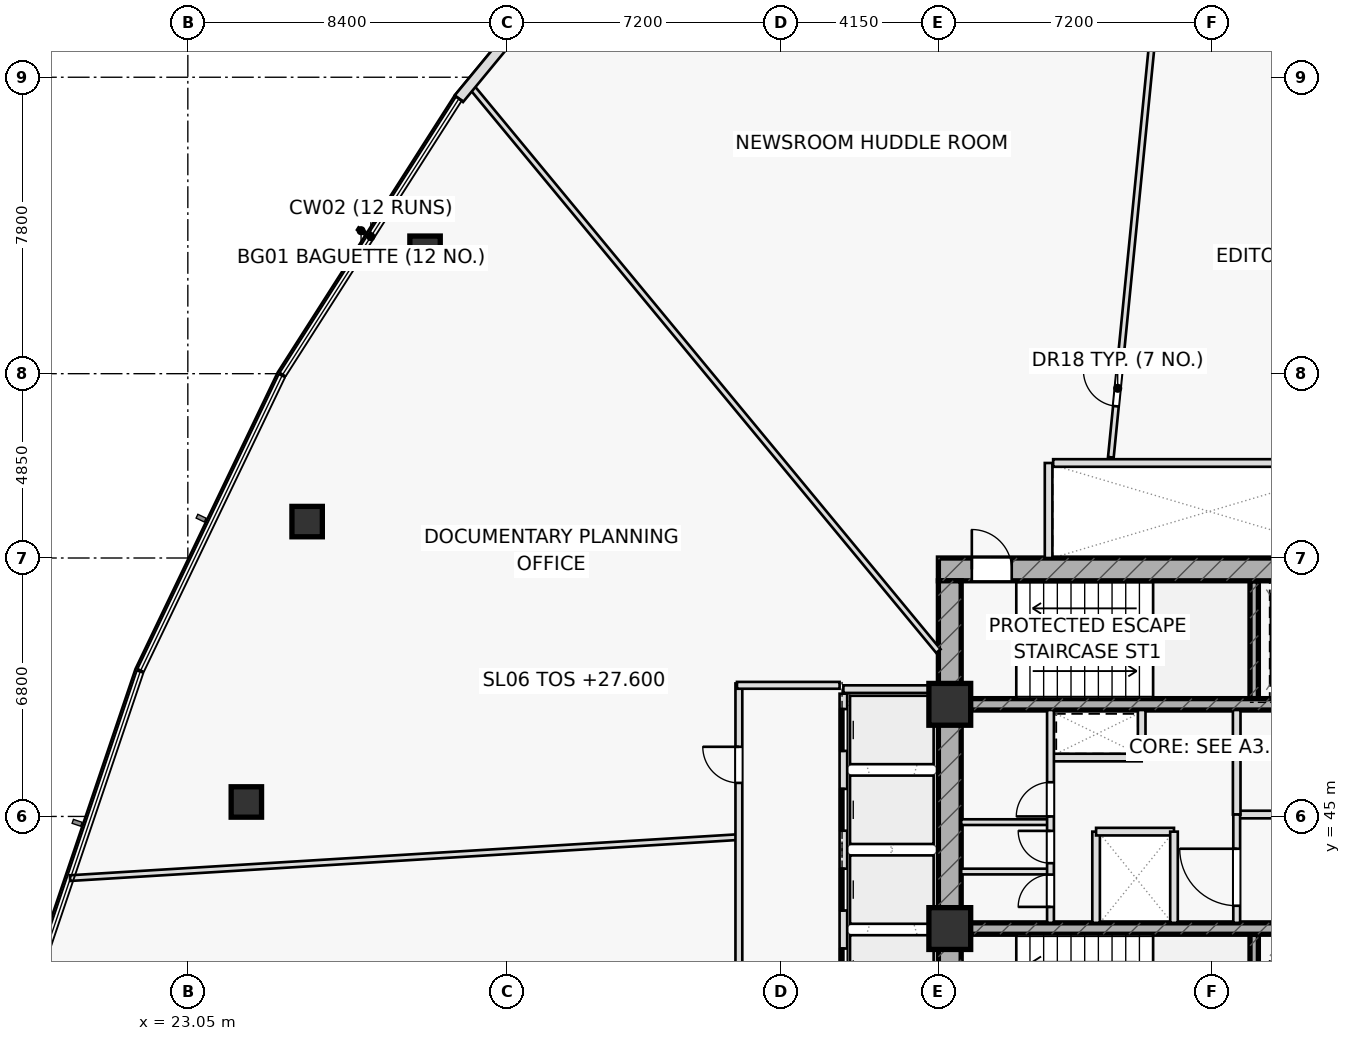
"""IFC4 building model, lengths in metres.
Left out: names, types, materials, properties, quantities, classifications, styles, units other than length and angle.
Written with IfcOpenShell. Run it as: python <this file> out.ifc"""

import sys

from ifc_helpers import new_model, si_unit, direction, frame, frame_2d, origin, origin_2d, place, context, subcontext, project, spatial, rectangle, hollow_rectangle, extrude, element, fill, save


model = new_model("IFC4")
c1 = context("Model", 3, precision=1e-05, world=origin(), true_north=direction((0.0, 1.0)))
c2 = subcontext(c1, "Body", "Model", "MODEL_VIEW")
j1 = project(units=[si_unit("LENGTHUNIT", "METRE"), si_unit("PLANEANGLEUNIT", "RADIAN")], contexts=[c1])
p1 = place(None, origin())
s1 = spatial("IfcSite", under=j1, at=p1, CompositionType="ELEMENT")
p2 = place(p1, origin())
s2 = spatial("IfcBuilding", under=s1, at=p2, CompositionType="ELEMENT")
p3 = place(p2, frame((0.0, 0.0, 27.6)))
s3 = spatial("IfcBuildingStorey", under=s2, at=p3, CompositionType="ELEMENT", Elevation=27.6)
for number, where, z_axis, x_axis in (
    (1, (51.11, 48.1, 0.0), (0.0, 0.0, 1.0), (0.0, 1.0, 0.0)),
    (2, (51.11, 38.8, 0.0), (0.0, 0.0, 1.0), (0.0, 1.0, 0.0)),
):
    element("IfcWall", number, at=place(p3, frame(where, z_axis=z_axis, x_axis=x_axis)), inside=s3, PredefinedType="SHEAR", context=c2, shape_type="SweptSolid", body=[
        extrude(rectangle(XDim=3.1, YDim=0.22, at=frame_2d((1.55, 0.0))), origin(), (0.0, 0.0, 1.0), 3.6),
    ])
p4 = place(p3, frame((42.8, 51.5, 0.0), z_axis=(0.0, 0.0, 1.0), x_axis=(1.0, 0.0, 0.0)))
e3 = element("IfcWall", 3, at=p4, inside=s3, PredefinedType="SHEAR", context=c2, shape_type="SweptSolid", body=[
    extrude(rectangle(XDim=14.4, YDim=0.6, at=frame_2d((7.2, 0.0))), origin(), (0.0, 0.0, 1.0), 3.6),
])
p5 = place(p4, frame((0.88, 0.0, 0.0)))
e4 = element("IfcOpeningElement", 4, at=p5, cuts=e3, PredefinedType="OPENING", context=c2, shape_type="SweptSolid", body=[
    extrude(rectangle(XDim=1.05, YDim=2.2, at=frame_2d((0.525, 1.1))), frame((0.0, 0.31, 0.0), z_axis=(0.0, -1.0, 0.0), x_axis=(1.0, 0.0, 0.0)), (0.0, 0.0, 1.0), 0.62),
])
p6 = place(p3, frame((43.1, 38.8, 0.0), z_axis=(0.0, 0.0, 1.0), x_axis=(0.0, 1.0, 0.0)))
e5 = element("IfcWall", 5, at=p6, inside=s3, PredefinedType="SHEAR", context=c2, shape_type="SweptSolid", body=[
    extrude(rectangle(XDim=12.4, YDim=0.6, at=frame_2d((6.2, 0.0))), origin(), (0.0, 0.0, 1.0), 3.6),
])
p7 = place(p3, frame((43.4, 47.95, 0.0), z_axis=(0.0, 0.0, 1.0), x_axis=(1.0, 0.0, 0.0)))
e6 = element("IfcWall", 6, at=p7, inside=s3, PredefinedType="SHEAR", context=c2, shape_type="SweptSolid", body=[
    extrude(rectangle(XDim=13.2, YDim=0.3, at=frame_2d((6.6, 0.0))), origin(), (0.0, 0.0, 1.0), 3.6),
])
p8 = place(p7, frame((8.345, 0.0, 0.0)))
e7 = element("IfcOpeningElement", 7, at=p8, cuts=e6, PredefinedType="OPENING", context=c2, shape_type="SweptSolid", body=[
    extrude(rectangle(XDim=1.15, YDim=2.2, at=frame_2d((0.575, 1.1))), frame((0.0, 0.16, 0.0), z_axis=(0.0, -1.0, 0.0), x_axis=(1.0, 0.0, 0.0)), (0.0, 0.0, 1.0), 0.32),
])
p9 = place(p7, frame((10.065, 0.0, 0.0)))
e8 = element("IfcOpeningElement", 8, at=p9, cuts=e6, PredefinedType="OPENING", context=c2, shape_type="SweptSolid", body=[
    extrude(rectangle(XDim=1.15, YDim=2.2, at=frame_2d((0.575, 1.1))), frame((0.0, 0.16, 0.0), z_axis=(0.0, -1.0, 0.0), x_axis=(1.0, 0.0, 0.0)), (0.0, 0.0, 1.0), 0.32),
])
p10 = place(p7, frame((11.645, 0.0, 0.0)))
e9 = element("IfcOpeningElement", 9, at=p10, cuts=e6, PredefinedType="OPENING", context=c2, shape_type="SweptSolid", body=[
    extrude(rectangle(XDim=1.15, YDim=2.2, at=frame_2d((0.575, 1.1))), frame((0.0, 0.16, 0.0), z_axis=(0.0, -1.0, 0.0), x_axis=(1.0, 0.0, 0.0)), (0.0, 0.0, 1.0), 0.32),
])
p11 = place(p3, frame((43.4, 42.05, 0.0), z_axis=(0.0, 0.0, 1.0), x_axis=(1.0, 0.0, 0.0)))
e10 = element("IfcWall", 10, at=p11, inside=s3, PredefinedType="SHEAR", context=c2, shape_type="SweptSolid", body=[
    extrude(rectangle(XDim=13.2, YDim=0.3, at=frame_2d((6.6, 0.0))), origin(), (0.0, 0.0, 1.0), 3.6),
])
for number, where, z_axis, x_axis in (
    (11, (43.1, 47.95, 0.0), (0.0, 0.0, 1.0), (1.0, 0.0, 0.0)),
    (12, (43.1, 42.05, 0.0), (0.0, 0.0, 1.0), (1.0, 0.0, 0.0)),
):
    element("IfcColumn", number, at=place(p3, frame(where, z_axis=z_axis, x_axis=x_axis)), inside=s3, PredefinedType="COLUMN", context=c2, shape_type="SweptSolid", body=[
        extrude(rectangle(XDim=1.1, YDim=1.1, at=origin_2d()), origin(), (0.0, 0.0, 1.0), 3.6),
    ])
for number, where, z_axis, x_axis in (
    (13, (29.292, 59.872, 0.0), (0.0, 0.0, 1.0), (1.0, 0.0, 0.0)),
    (14, (26.189, 52.758, 0.0), (0.0, 0.0, 1.0), (1.0, 0.0, 0.0)),
    (15, (24.59, 45.381, 0.0), (0.0, 0.0, 1.0), (1.0, 0.0, 0.0)),
):
    element("IfcColumn", number, at=place(p3, frame(where, z_axis=z_axis, x_axis=x_axis)), inside=s3, PredefinedType="COLUMN", context=c2, shape_type="SweptSolid", body=[
        extrude(hollow_rectangle(XDim=0.8, YDim=0.8, WallThickness=0.045, at=origin_2d()), origin(), (0.0, 0.0, 1.0), 3.6),
    ])
for number, where, z_axis, x_axis in (
    (16, (40.3, 48.35, 0.0), (0.0, 0.0, 1.0), (1.0, 0.0, 0.0)),
    (17, (45.7, 51.8, 0.0), (0.0, 0.0, 1.0), (0.0, 1.0, 0.0)),
):
    element("IfcWall", number, at=place(p3, frame(where, z_axis=z_axis, x_axis=x_axis)), inside=s3, PredefinedType="PARTITIONING", context=c2, shape_type="SweptSolid", body=[
        extrude(rectangle(XDim=2.5, YDim=0.2, at=frame_2d((1.25, 0.0))), origin(), (0.0, 0.0, 1.0), 3.6),
    ])
p12 = place(p3, frame((45.75, 46.55, 0.0), z_axis=(0.0, 0.0, 1.0), x_axis=(1.0, 0.0, 0.0)))
e18 = element("IfcWall", 18, at=p12, inside=s3, PredefinedType="PARTITIONING", context=c2, shape_type="SweptSolid", body=[
    extrude(rectangle(XDim=2.4, YDim=0.2, at=frame_2d((1.2, 0.0))), origin(), (0.0, 0.0, 1.0), 3.6),
])
p13 = place(p3, frame((48.15, 46.55, 0.0), z_axis=(0.0, 0.0, 1.0), x_axis=(0.0, 1.0, 0.0)))
e19 = element("IfcWall", 19, at=p13, inside=s3, PredefinedType="PARTITIONING", context=c2, shape_type="SweptSolid", body=[
    extrude(rectangle(XDim=1.25, YDim=0.2, at=frame_2d((0.625, 0.0))), origin(), (0.0, 0.0, 1.0), 3.6),
])
p14 = place(p3, frame((46.95, 42.2, 0.0), z_axis=(0.0, 0.0, 1.0), x_axis=(0.0, 1.0, 0.0)))
e20 = element("IfcWall", 20, at=p14, inside=s3, PredefinedType="PARTITIONING", context=c2, shape_type="SweptSolid", body=[
    extrude(rectangle(XDim=2.4, YDim=0.2, at=frame_2d((1.2, 0.0))), origin(), (0.0, 0.0, 1.0), 3.6),
])
p15 = place(p3, frame((46.95, 44.6, 0.0), z_axis=(0.0, 0.0, 1.0), x_axis=(1.0, 0.0, 0.0)))
e21 = element("IfcWall", 21, at=p15, inside=s3, PredefinedType="PARTITIONING", context=c2, shape_type="SweptSolid", body=[
    extrude(rectangle(XDim=2.05, YDim=0.2, at=frame_2d((1.025, 0.0))), origin(), (0.0, 0.0, 1.0), 3.6),
])
p16 = place(p3, frame((50.65, 45.05, 0.0), z_axis=(0.0, 0.0, 1.0), x_axis=(1.0, 0.0, 0.0)))
e22 = element("IfcWall", 22, at=p16, inside=s3, PredefinedType="PARTITIONING", context=c2, shape_type="SweptSolid", body=[
    extrude(rectangle(XDim=5.95, YDim=0.2, at=frame_2d((2.975, 0.0))), origin(), (0.0, 0.0, 1.0), 3.6),
])
p17 = place(p16, frame((1.35, 0.0, 0.0)))
e23 = element("IfcOpeningElement", 23, at=p17, cuts=e22, PredefinedType="OPENING", context=c2, shape_type="SweptSolid", body=[
    extrude(rectangle(XDim=1.5, YDim=2.2, at=frame_2d((0.75, 1.1))), frame((0.0, 0.11, 0.0), z_axis=(0.0, -1.0, 0.0), x_axis=(1.0, 0.0, 0.0)), (0.0, 0.0, 1.0), 0.22),
])
p18 = place(p3, frame((50.65, 45.05, 0.0), z_axis=(0.0, 0.0, 1.0), x_axis=(0.0, 1.0, 0.0)))
e24 = element("IfcWall", 24, at=p18, inside=s3, PredefinedType="PARTITIONING", context=c2, shape_type="SweptSolid", body=[
    extrude(rectangle(XDim=2.75, YDim=0.2, at=frame_2d((1.375, 0.0))), origin(), (0.0, 0.0, 1.0), 3.6),
])
p19 = place(p3, frame((50.65, 42.2, 0.0), z_axis=(0.0, 0.0, 1.0), x_axis=(0.0, 1.0, 0.0)))
e25 = element("IfcWall", 25, at=p19, inside=s3, PredefinedType="PARTITIONING", context=c2, shape_type="SweptSolid", body=[
    extrude(rectangle(XDim=2.85, YDim=0.18, at=frame_2d((1.425, 0.0))), origin(), (0.0, 0.0, 1.0), 3.6),
])
p20 = place(p19, frame((0.45, 0.0, 0.0)))
e26 = element("IfcOpeningElement", 26, at=p20, cuts=e25, PredefinedType="OPENING", context=c2, shape_type="SweptSolid", body=[
    extrude(rectangle(XDim=1.5, YDim=2.2, at=frame_2d((0.75, 1.1))), frame((0.0, 0.1, 0.0), z_axis=(0.0, -1.0, 0.0), x_axis=(1.0, 0.0, 0.0)), (0.0, 0.0, 1.0), 0.2),
])
for number, where, z_axis, x_axis in (
    (27, (43.4, 43.55, 0.0), (0.0, 0.0, 1.0), (1.0, 0.0, 0.0)),
    (28, (43.4, 44.85, 0.0), (0.0, 0.0, 1.0), (1.0, 0.0, 0.0)),
):
    element("IfcWall", number, at=place(p3, frame(where, z_axis=z_axis, x_axis=x_axis)), inside=s3, PredefinedType="PARTITIONING", context=c2, shape_type="SweptSolid", body=[
        extrude(rectangle(XDim=2.35, YDim=0.15, at=frame_2d((1.175, 0.0))), origin(), (0.0, 0.0, 1.0), 3.6),
    ])
p21 = place(p3, frame((45.75, 42.2, 0.0), z_axis=(0.0, 0.0, 1.0), x_axis=(0.0, 1.0, 0.0)))
e29 = element("IfcWall", 29, at=p21, inside=s3, PredefinedType="PARTITIONING", context=c2, shape_type="SweptSolid", body=[
    extrude(rectangle(XDim=5.6, YDim=0.18, at=frame_2d((2.8, 0.0))), origin(), (0.0, 0.0, 1.0), 3.6),
])
p22 = place(p21, frame((0.42, 0.0, 0.0)))
e30 = element("IfcOpeningElement", 30, at=p22, cuts=e29, PredefinedType="OPENING", context=c2, shape_type="SweptSolid", body=[
    extrude(rectangle(XDim=0.85, YDim=2.05, at=frame_2d((0.425, 1.025))), frame((0.0, 0.1, 0.0), z_axis=(0.0, -1.0, 0.0), x_axis=(1.0, 0.0, 0.0)), (0.0, 0.0, 1.0), 0.2),
])
p23 = place(p21, frame((1.57, 0.0, 0.0)))
e31 = element("IfcOpeningElement", 31, at=p23, cuts=e29, PredefinedType="OPENING", context=c2, shape_type="SweptSolid", body=[
    extrude(rectangle(XDim=0.85, YDim=2.05, at=frame_2d((0.425, 1.025))), frame((0.0, 0.1, 0.0), z_axis=(0.0, -1.0, 0.0), x_axis=(1.0, 0.0, 0.0)), (0.0, 0.0, 1.0), 0.2),
])
p24 = place(p21, frame((2.8, 0.0, 0.0)))
e32 = element("IfcOpeningElement", 32, at=p24, cuts=e29, PredefinedType="OPENING", context=c2, shape_type="SweptSolid", body=[
    extrude(rectangle(XDim=0.9, YDim=2.05, at=frame_2d((0.45, 1.025))), frame((0.0, 0.1, 0.0), z_axis=(0.0, -1.0, 0.0), x_axis=(1.0, 0.0, 0.0)), (0.0, 0.0, 1.0), 0.2),
])
p25 = place(p3, frame((47.338, 54.45, 0.0), z_axis=(0.0, 0.0, 1.0), x_axis=(0.098805694286, 0.995106745418, 0.0)))
e33 = element("IfcWall", 33, at=p25, inside=s3, PredefinedType="PARTITIONING", context=c2, shape_type="SweptSolid", body=[
    extrude(rectangle(XDim=22.51, YDim=0.15, at=frame_2d((11.255, 0.0))), origin(), (0.0, 0.0, 1.0), 2.975),
])
p26 = place(p25, frame((1.35, 0.0, 0.0)))
e34 = element("IfcOpeningElement", 34, at=p26, cuts=e33, PredefinedType="OPENING", context=c2, shape_type="SweptSolid", body=[
    extrude(rectangle(XDim=0.95, YDim=2.05, at=frame_2d((0.475, 1.025))), frame((0.0, 0.085, 0.0), z_axis=(0.0, -1.0, 0.0), x_axis=(1.0, 0.0, 0.0)), (0.0, 0.0, 1.0), 0.17),
])
p27 = place(p3, frame((42.8, 49.351, 0.0), z_axis=(0.0, 0.0, 1.0), x_axis=(-0.637468497452, 0.770476420637, 0.0)))
e35 = element("IfcWall", 35, at=p27, inside=s3, PredefinedType="PARTITIONING", context=c2, shape_type="SweptSolid", body=[
    extrude(rectangle(XDim=19.339, YDim=0.15, at=frame_2d((9.669, 0.0))), origin(), (0.0, 0.0, 1.0), 2.925),
])
p28 = place(p3, frame((37.55, 44.457, 0.0), z_axis=(0.0, 0.0, 1.0), x_axis=(-0.998123200765, -0.061237864879, 0.0)))
e36 = element("IfcWall", 36, at=p28, inside=s3, PredefinedType="PARTITIONING", context=c2, shape_type="SweptSolid", body=[
    extrude(rectangle(XDim=17.634, YDim=0.15, at=frame_2d((8.817, 0.0))), origin(), (0.0, 0.0, 1.0), 2.975),
])
p29 = place(p3, frame((37.55, 35.75, 0.0), z_axis=(0.0, 0.0, 1.0), x_axis=(0.0, 1.0, 0.0)))
e37 = element("IfcWall", 37, at=p29, inside=s3, PredefinedType="PARTITIONING", context=c2, shape_type="SweptSolid", body=[
    extrude(rectangle(XDim=12.75, YDim=0.18, at=frame_2d((6.375, 0.0))), origin(), (0.0, 0.0, 1.0), 2.925),
])
p30 = place(p29, frame((3.993, 0.0, 0.0)))
e38 = element("IfcOpeningElement", 38, at=p30, cuts=e37, PredefinedType="OPENING", context=c2, shape_type="SweptSolid", body=[
    extrude(rectangle(XDim=0.95, YDim=2.05, at=frame_2d((0.475, 1.025))), frame((0.0, 0.1, 0.0), z_axis=(0.0, -1.0, 0.0), x_axis=(1.0, 0.0, 0.0)), (0.0, 0.0, 1.0), 0.2),
])
p31 = place(p29, frame((10.132, 0.0, 0.0)))
e39 = element("IfcOpeningElement", 39, at=p31, cuts=e37, PredefinedType="OPENING", context=c2, shape_type="SweptSolid", body=[
    extrude(rectangle(XDim=0.95, YDim=2.05, at=frame_2d((0.475, 1.025))), frame((0.0, 0.1, 0.0), z_axis=(0.0, -1.0, 0.0), x_axis=(1.0, 0.0, 0.0)), (0.0, 0.0, 1.0), 0.2),
])
p32 = place(p3, frame((37.5, 48.45, 0.0), z_axis=(0.0, 0.0, 1.0), x_axis=(1.0, 0.0, 0.0)))
e40 = element("IfcWall", 40, at=p32, inside=s3, PredefinedType="PARTITIONING", context=c2, shape_type="SweptSolid", body=[
    extrude(rectangle(XDim=2.7, YDim=0.18, at=frame_2d((1.35, 0.0))), origin(), (0.0, 0.0, 1.0), 3.6),
])
p33 = place(p3, frame((35.691, 70.561, 0.0), z_axis=(0.0, 0.0, 1.0), x_axis=(-0.636414008512, -0.771347658173, 0.0)))
e41 = element("IfcWall", 41, at=p33, inside=s3, PredefinedType="STANDARD", context=c2, shape_type="SweptSolid", body=[
    extrude(rectangle(XDim=8.654, YDim=0.28, at=frame_2d((4.327, 0.0))), origin(), (0.0, 0.0, 1.0), 3.6),
])
p34 = place(p3, frame((40.3, 40.02, 0.0), z_axis=(0.0, 0.0, 1.0), x_axis=(0.0, 1.0, 0.0)))
e42 = element("IfcWall", 42, at=p34, inside=s3, PredefinedType="PARTITIONING", context=c2, shape_type="SweptSolid", body=[
    extrude(rectangle(XDim=8.21, YDim=0.2, at=frame_2d((4.105, 0.0))), origin(), (0.0, 0.0, 1.0), 3.6),
])
p35 = place(p34, frame((0.405, 0.0, 0.0)))
e43 = element("IfcOpeningElement", 43, at=p35, cuts=e42, PredefinedType="OPENING", context=c2, shape_type="SweptSolid", body=[
    extrude(rectangle(XDim=1.1, YDim=2.15, at=frame_2d((0.55, 1.075))), frame((0.0, 0.11, 0.0), z_axis=(0.0, -1.0, 0.0), x_axis=(1.0, 0.0, 0.0)), (0.0, 0.0, 1.0), 0.22),
])
p36 = place(p34, frame((2.505, 0.0, 0.0)))
e44 = element("IfcOpeningElement", 44, at=p36, cuts=e42, PredefinedType="OPENING", context=c2, shape_type="SweptSolid", body=[
    extrude(rectangle(XDim=1.1, YDim=2.15, at=frame_2d((0.55, 1.075))), frame((0.0, 0.11, 0.0), z_axis=(0.0, -1.0, 0.0), x_axis=(1.0, 0.0, 0.0)), (0.0, 0.0, 1.0), 0.22),
])
p37 = place(p34, frame((4.605, 0.0, 0.0)))
e45 = element("IfcOpeningElement", 45, at=p37, cuts=e42, PredefinedType="OPENING", context=c2, shape_type="SweptSolid", body=[
    extrude(rectangle(XDim=1.1, YDim=2.15, at=frame_2d((0.55, 1.075))), frame((0.0, 0.11, 0.0), z_axis=(0.0, -1.0, 0.0), x_axis=(1.0, 0.0, 0.0)), (0.0, 0.0, 1.0), 0.22),
])
p38 = place(p34, frame((6.705, 0.0, 0.0)))
e46 = element("IfcOpeningElement", 46, at=p38, cuts=e42, PredefinedType="OPENING", context=c2, shape_type="SweptSolid", body=[
    extrude(rectangle(XDim=1.1, YDim=2.15, at=frame_2d((0.55, 1.075))), frame((0.0, 0.11, 0.0), z_axis=(0.0, -1.0, 0.0), x_axis=(1.0, 0.0, 0.0)), (0.0, 0.0, 1.0), 0.22),
])
p39 = place(p3, frame((49.0, 42.2, 0.0), z_axis=(0.0, 0.0, 1.0), x_axis=(0.0, 1.0, 0.0)))
e47 = element("IfcWall", 47, at=p39, inside=s3, PredefinedType="PARTITIONING", context=c2, shape_type="SweptSolid", body=[
    extrude(rectangle(XDim=2.4, YDim=0.2, at=frame_2d((1.2, 0.0))), origin(), (0.0, 0.0, 1.0), 3.6),
])
p40 = place(p3, frame((45.82, 54.3, 0.0), z_axis=(0.0, 0.0, 1.0), x_axis=(1.0, 0.0, 0.0)))
e48 = element("IfcWall", 48, at=p40, inside=s3, PredefinedType="PARTITIONING", context=c2, shape_type="SweptSolid", body=[
    extrude(rectangle(XDim=8.31, YDim=0.2, at=frame_2d((4.155, 0.0))), origin(), (0.0, 0.0, 1.0), 3.6),
])
p41 = place(p5, origin())
e49 = element("IfcDoor", 49, at=p41, inside=s3, OperationType="SINGLE_SWING_LEFT", PredefinedType="DOOR", context=c2, shape_type="SweptSolid", body=[
    extrude(rectangle(XDim=1.05, YDim=2.2, at=frame_2d((0.525, 1.1))), frame((0.0, 0.025, 0.0), z_axis=(0.0, -1.0, 0.0), x_axis=(1.0, 0.0, 0.0)), (0.0, 0.0, 1.0), 0.05),
])
fill(e4, e49)
p42 = place(p20, origin())
e50 = element("IfcDoor", 50, at=p42, inside=s3, OperationType="SINGLE_SWING_RIGHT", PredefinedType="DOOR", context=c2, shape_type="SweptSolid", body=[
    extrude(rectangle(XDim=1.5, YDim=2.2, at=frame_2d((0.75, 1.1))), frame((0.0, 0.025, 0.0), z_axis=(0.0, -1.0, 0.0), x_axis=(1.0, 0.0, 0.0)), (0.0, 0.0, 1.0), 0.05),
])
fill(e26, e50)
p43 = place(p22, origin())
e51 = element("IfcDoor", 51, at=p43, inside=s3, OperationType="SINGLE_SWING_LEFT", PredefinedType="DOOR", context=c2, shape_type="SweptSolid", body=[
    extrude(rectangle(XDim=0.85, YDim=2.05, at=frame_2d((0.425, 1.025))), frame((0.0, 0.025, 0.0), z_axis=(0.0, -1.0, 0.0), x_axis=(1.0, 0.0, 0.0)), (0.0, 0.0, 1.0), 0.05),
])
fill(e30, e51)
p44 = place(p23, origin())
e52 = element("IfcDoor", 52, at=p44, inside=s3, OperationType="SINGLE_SWING_RIGHT", PredefinedType="DOOR", context=c2, shape_type="SweptSolid", body=[
    extrude(rectangle(XDim=0.85, YDim=2.05, at=frame_2d((0.425, 1.025))), frame((0.0, 0.025, 0.0), z_axis=(0.0, -1.0, 0.0), x_axis=(1.0, 0.0, 0.0)), (0.0, 0.0, 1.0), 0.05),
])
fill(e31, e52)
p45 = place(p24, origin())
e53 = element("IfcDoor", 53, at=p45, inside=s3, OperationType="SINGLE_SWING_LEFT", PredefinedType="DOOR", context=c2, shape_type="SweptSolid", body=[
    extrude(rectangle(XDim=0.9, YDim=2.05, at=frame_2d((0.45, 1.025))), frame((0.0, 0.025, 0.0), z_axis=(0.0, -1.0, 0.0), x_axis=(1.0, 0.0, 0.0)), (0.0, 0.0, 1.0), 0.05),
])
fill(e32, e53)
p46 = place(p26, origin())
e54 = element("IfcDoor", 54, at=p46, inside=s3, OperationType="SINGLE_SWING_RIGHT", PredefinedType="DOOR", context=c2, shape_type="SweptSolid", body=[
    extrude(rectangle(XDim=0.95, YDim=2.05, at=frame_2d((0.475, 1.025))), frame((0.0, 0.025, 0.0), z_axis=(0.0, -1.0, 0.0), x_axis=(1.0, 0.0, 0.0)), (0.0, 0.0, 1.0), 0.05),
])
fill(e34, e54)
p47 = place(p31, origin())
e55 = element("IfcDoor", 55, at=p47, inside=s3, OperationType="SINGLE_SWING_RIGHT", PredefinedType="DOOR", context=c2, shape_type="SweptSolid", body=[
    extrude(rectangle(XDim=0.95, YDim=2.05, at=frame_2d((0.475, 1.025))), frame((0.0, 0.025, 0.0), z_axis=(0.0, -1.0, 0.0), x_axis=(1.0, 0.0, 0.0)), (0.0, 0.0, 1.0), 0.05),
])
fill(e39, e55)
p48 = place(p35, origin())
e56 = element("IfcDoor", 56, at=p48, inside=s3, OperationType="SLIDING_TO_LEFT", PredefinedType="DOOR", context=c2, shape_type="SweptSolid", body=[
    extrude(rectangle(XDim=1.1, YDim=2.15, at=frame_2d((0.55, 1.075))), frame((0.0, 0.025, 0.0), z_axis=(0.0, -1.0, 0.0), x_axis=(1.0, 0.0, 0.0)), (0.0, 0.0, 1.0), 0.05),
])
fill(e43, e56)
p49 = place(p36, origin())
e57 = element("IfcDoor", 57, at=p49, inside=s3, OperationType="SLIDING_TO_RIGHT", PredefinedType="DOOR", context=c2, shape_type="SweptSolid", body=[
    extrude(rectangle(XDim=1.1, YDim=2.15, at=frame_2d((0.55, 1.075))), frame((0.0, 0.025, 0.0), z_axis=(0.0, -1.0, 0.0), x_axis=(1.0, 0.0, 0.0)), (0.0, 0.0, 1.0), 0.05),
])
fill(e44, e57)
p50 = place(p37, origin())
e58 = element("IfcDoor", 58, at=p50, inside=s3, OperationType="SLIDING_TO_LEFT", PredefinedType="DOOR", context=c2, shape_type="SweptSolid", body=[
    extrude(rectangle(XDim=1.1, YDim=2.15, at=frame_2d((0.55, 1.075))), frame((0.0, 0.025, 0.0), z_axis=(0.0, -1.0, 0.0), x_axis=(1.0, 0.0, 0.0)), (0.0, 0.0, 1.0), 0.05),
])
fill(e45, e58)
p51 = place(p38, origin())
e59 = element("IfcDoor", 59, at=p51, inside=s3, OperationType="SLIDING_TO_RIGHT", PredefinedType="DOOR", context=c2, shape_type="SweptSolid", body=[
    extrude(rectangle(XDim=1.1, YDim=2.15, at=frame_2d((0.55, 1.075))), frame((0.0, 0.025, 0.0), z_axis=(0.0, -1.0, 0.0), x_axis=(1.0, 0.0, 0.0)), (0.0, 0.0, 1.0), 0.05),
])
fill(e46, e59)
save(model, sys.argv[1])
